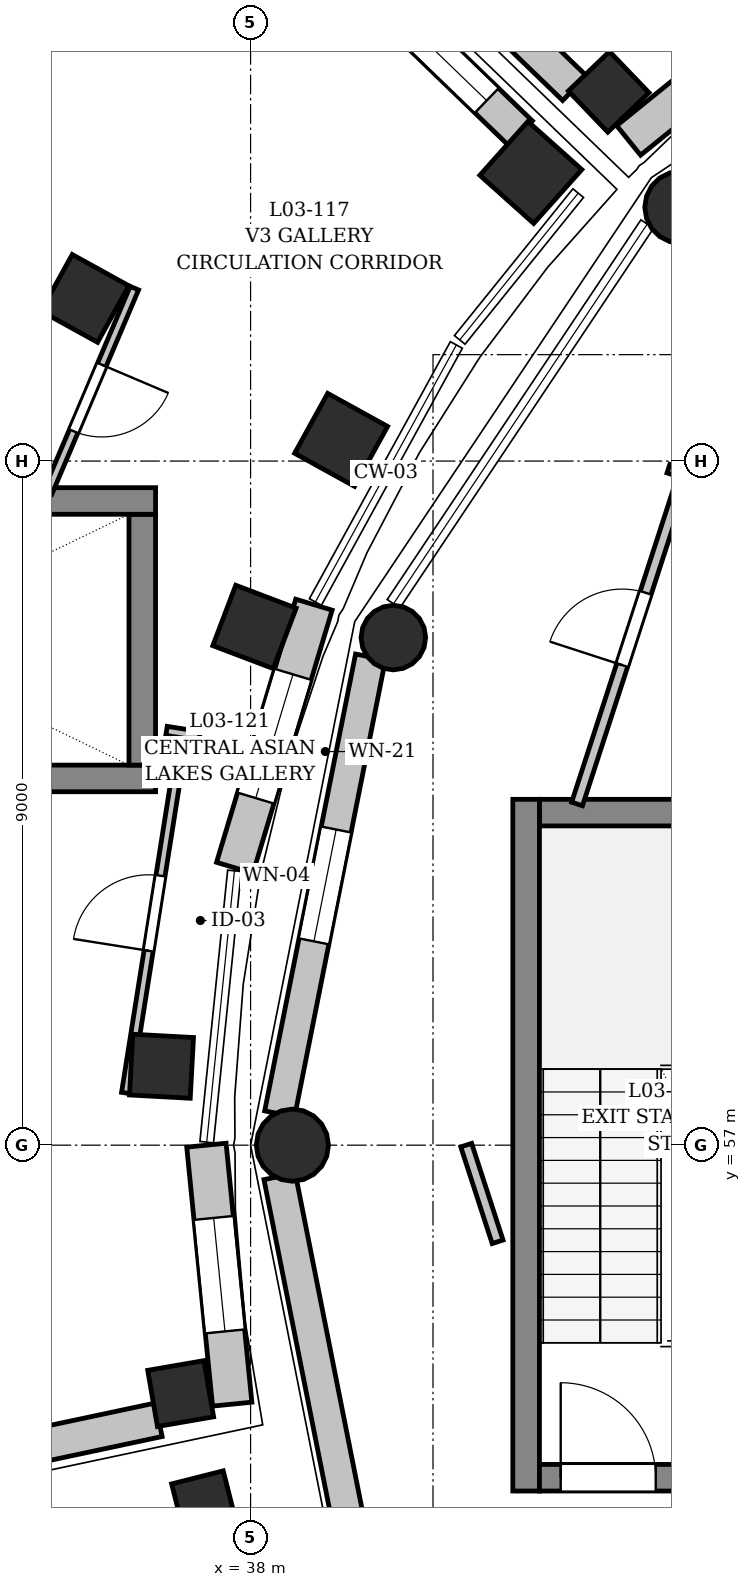
"""IFC4 building model, lengths in metres.
Left out: names, types, materials, properties, quantities, classifications, styles, units other than length and angle.
Written with IfcOpenShell. Run it as: python <this file> out.ifc"""

import sys

from ifc_helpers import new_model, si_unit, direction, frame, frame_2d, origin, origin_2d, place, context, subcontext, project, spatial, rectangle, circle, extrude, element, fill, save


model = new_model("IFC4")
c1 = context("Model", 3, precision=1e-05, world=origin(), true_north=direction((0.0, 1.0)))
c2 = subcontext(c1, "Body", "Model", "MODEL_VIEW")
j1 = project(units=[si_unit("LENGTHUNIT", "METRE"), si_unit("PLANEANGLEUNIT", "RADIAN")], contexts=[c1])
p1 = place(None, origin())
s1 = spatial("IfcSite", under=j1, at=p1, CompositionType="ELEMENT")
p2 = place(p1, origin())
s2 = spatial("IfcBuilding", under=s1, at=p2, CompositionType="ELEMENT")
p3 = place(p2, frame((0.0, 0.0, 10.2)))
s3 = spatial("IfcBuildingStorey", under=s2, at=p3, CompositionType="ELEMENT", Elevation=10.2)
p4 = place(p3, frame((43.661, 69.339, 0.0), z_axis=(0.0, 0.0, 1.0), x_axis=(-0.707106781187, 0.707106781187, 0.0)))
e1 = element("IfcColumn", 1, at=p4, inside=s3, PredefinedType="COLUMN", context=c2, shape_type="SweptSolid", body=[
    extrude(circle(Radius=0.475, at=origin_2d()), origin(), (0.0, 0.0, 1.0), 4.45),
])
p5 = place(p3, frame((39.878, 63.678, 0.0), z_axis=(0.0, 0.0, 1.0), x_axis=(-0.923879532511, 0.382683432365, 0.0)))
e2 = element("IfcColumn", 2, at=p5, inside=s3, PredefinedType="COLUMN", context=c2, shape_type="SweptSolid", body=[
    extrude(circle(Radius=0.425, at=origin_2d()), origin(), (0.0, 0.0, 1.0), 4.45),
])
p6 = place(p3, frame((38.55, 57.0, 0.0), z_axis=(0.0, 0.0, 1.0), x_axis=(-1.0, 0.0, 0.0)))
e3 = element("IfcColumn", 3, at=p6, inside=s3, PredefinedType="COLUMN", context=c2, shape_type="SweptSolid", body=[
    extrude(circle(Radius=0.475, at=origin_2d()), origin(), (0.0, 0.0, 1.0), 4.45),
])
p7 = place(p3, frame((41.687, 69.797, 0.0), z_axis=(0.0, 0.0, 1.0), x_axis=(-0.745475999683, 0.666532470249, 0.0)))
e4 = element("IfcColumn", 4, at=p7, inside=s3, PredefinedType="COLUMN", context=c2, shape_type="SweptSolid", body=[
    extrude(rectangle(XDim=0.95, YDim=0.95, at=origin_2d()), origin(), (0.0, 0.0, 1.0), 4.58),
])
p8 = place(p3, frame((39.191, 66.279, 0.0), z_axis=(0.0, 0.0, 1.0), x_axis=(-0.875464527, 0.483282383255, 0.0)))
e5 = element("IfcColumn", 5, at=p8, inside=s3, PredefinedType="COLUMN", context=c2, shape_type="SweptSolid", body=[
    extrude(rectangle(XDim=0.9, YDim=0.9, at=origin_2d()), origin(), (0.0, 0.0, 1.0), 4.58),
])
for number, where, z_axis, x_axis in (
    (6, (35.821, 68.14, 0.0), (0.0, 0.0, 1.0), (-0.875, 0.483, 0.0)),
    (7, (38.051, 63.818, 0.0), (0.0, 0.0, 1.0), (-0.935, 0.355, 0.0)),
):
    element("IfcColumn", number, at=place(p3, frame(where, z_axis=z_axis, x_axis=x_axis)), inside=s3, PredefinedType="COLUMN", context=c2, shape_type="SweptSolid", body=[
        extrude(rectangle(XDim=0.85, YDim=0.85, at=origin_2d()), origin(), (0.0, 0.0, 1.0), 4.58),
    ])
p9 = place(p3, frame((36.828, 58.038, 0.0), z_axis=(0.0, 0.0, 1.0), x_axis=(-0.998536670326, 0.054078812985, 0.0)))
e8 = element("IfcColumn", 8, at=p9, inside=s3, PredefinedType="COLUMN", context=c2, shape_type="SweptSolid", body=[
    extrude(rectangle(XDim=0.8, YDim=0.8, at=origin_2d()), origin(), (0.0, 0.0, 1.0), 4.58),
])
p10 = place(p3, frame((37.08, 53.732, 0.0), z_axis=(0.0, 0.0, 1.0), x_axis=(-0.985407898483, -0.170209499166, 0.0)))
e9 = element("IfcColumn", 9, at=p10, inside=s3, PredefinedType="COLUMN", context=c2, shape_type="SweptSolid", body=[
    extrude(rectangle(XDim=0.75, YDim=0.75, at=origin_2d()), origin(), (0.0, 0.0, 1.0), 4.58),
])
p11 = place(p3, frame((42.711, 70.858, 0.0), z_axis=(0.0, 0.0, 1.0), x_axis=(-0.69214317387, 0.721760228098, 0.0)))
e10 = element("IfcColumn", 10, at=p11, inside=s3, PredefinedType="COLUMN", context=c2, shape_type="SweptSolid", body=[
    extrude(rectangle(XDim=0.75, YDim=0.75, at=origin_2d()), origin(), (0.0, 0.0, 1.0), 4.52),
])
p12 = place(p3, frame((37.387, 52.29, -0.22), z_axis=(0.0, 0.0, 1.0), x_axis=(-0.969445349895, -0.245307385879, 0.0)))
e11 = element("IfcColumn", 11, at=p12, inside=s3, PredefinedType="COLUMN", context=c2, shape_type="SweptSolid", body=[
    extrude(rectangle(XDim=0.7, YDim=0.7, at=origin_2d()), origin(), (0.0, 0.0, 1.0), 0.423),
])
p13 = place(p3, frame((38.382, 57.412, 0.0), z_axis=(0.0, 0.0, 1.0), x_axis=(0.195089418663, 0.980785460091, 0.0)))
e12 = element("IfcWall", 12, at=p13, inside=s3, PredefinedType="SOLIDWALL", context=c2, shape_type="SweptSolid", body=[
    extrude(rectangle(XDim=6.128, YDim=0.4, at=frame_2d((3.064, 0.0))), origin(), (0.0, 0.0, 1.0), 3.94),
])
p14 = place(p13, frame((2.314, 0.0, 0.9)))
e13 = element("IfcOpeningElement", 13, at=p14, cuts=e12, PredefinedType="OPENING", context=c2, shape_type="SweptSolid", body=[
    extrude(rectangle(XDim=1.5, YDim=2.1, at=frame_2d((0.75, 1.05))), frame((0.0, 0.21, 0.0), z_axis=(0.0, -1.0, 0.0), x_axis=(1.0, 0.0, 0.0)), (0.0, 0.0, 1.0), 0.42),
])
p15 = place(p3, frame((39.577, 50.578, 0.0), z_axis=(0.0, 0.0, 1.0), x_axis=(-0.195089418663, 0.980785460091, 0.0)))
e14 = element("IfcWall", 14, at=p15, inside=s3, PredefinedType="SOLIDWALL", context=c2, shape_type="SweptSolid", body=[
    extrude(rectangle(XDim=6.128, YDim=0.42, at=frame_2d((3.064, 0.0))), origin(), (0.0, 0.0, 1.0), 3.52),
])
p16 = place(p3, frame((38.833, 64.111, 0.0), z_axis=(0.0, 0.0, 1.0), x_axis=(-0.288190467342, -0.957573106626, 0.0)))
e15 = element("IfcWall", 15, at=p16, inside=s3, PredefinedType="SOLIDWALL", context=c2, shape_type="SweptSolid", body=[
    extrude(rectangle(XDim=3.615, YDim=0.5, at=frame_2d((1.807, 0.0))), origin(), (0.0, 0.0, 1.0), 5.16),
])
p17 = place(p16, frame((0.958, 0.0, 0.9)))
e16 = element("IfcOpeningElement", 16, at=p17, cuts=e15, PredefinedType="OPENING", context=c2, shape_type="SweptSolid", body=[
    extrude(rectangle(XDim=1.7, YDim=1.55, at=frame_2d((0.85, 0.775))), frame((0.0, 0.26, 0.0), z_axis=(0.0, -1.0, 0.0), x_axis=(1.0, 0.0, 0.0)), (0.0, 0.0, 1.0), 0.52),
])
p18 = place(p3, frame((37.419, 57.0, 0.0), z_axis=(0.0, 0.0, 1.0), x_axis=(0.09912244439, -0.995075243898, 0.0)))
e17 = element("IfcWall", 17, at=p18, inside=s3, PredefinedType="SOLIDWALL", context=c2, shape_type="SweptSolid", body=[
    extrude(rectangle(XDim=3.424, YDim=0.52, at=frame_2d((1.712, 0.0))), origin(), (0.0, 0.0, 1.0), 5.16),
])
p19 = place(p18, frame((0.962, 0.0, 0.9)))
e18 = element("IfcOpeningElement", 18, at=p19, cuts=e17, PredefinedType="OPENING", context=c2, shape_type="SweptSolid", body=[
    extrude(rectangle(XDim=1.5, YDim=2.1, at=frame_2d((0.75, 1.05))), frame((0.0, 0.27, 0.0), z_axis=(0.0, -1.0, 0.0), x_axis=(1.0, 0.0, 0.0)), (0.0, 0.0, 1.0), 0.54),
])
p20 = place(p3, frame((36.79, 53.387, 0.0), z_axis=(0.0, 0.0, 1.0), x_axis=(-0.978151790835, -0.207891976965, 0.0)))
e19 = element("IfcWall", 19, at=p20, inside=s3, PredefinedType="SOLIDWALL", context=c2, shape_type="SweptSolid", body=[
    extrude(rectangle(XDim=6.153, YDim=0.45, at=frame_2d((3.076, 0.0))), origin(), (0.0, 0.0, 1.0), 4.723),
])
p21 = place(p3, frame((39.403, 72.389, 0.0), z_axis=(0.0, 0.0, 1.0), x_axis=(0.719339497973, -0.694658683568, 0.0)))
e20 = element("IfcWall", 20, at=p21, inside=s3, PredefinedType="SOLIDWALL", context=c2, shape_type="SweptSolid", body=[
    extrude(rectangle(XDim=2.987, YDim=0.45, at=frame_2d((1.494, 0.0))), origin(), (0.0, 0.0, 1.0), 4.723),
])
p22 = place(p21, frame((0.619, 0.0, 0.9)))
e21 = element("IfcOpeningElement", 21, at=p22, cuts=e20, PredefinedType="OPENING", context=c2, shape_type="SweptSolid", body=[
    extrude(rectangle(XDim=1.75, YDim=1.85, at=frame_2d((0.875, 0.925))), frame((0.0, 0.235, 0.0), z_axis=(0.0, -1.0, 0.0), x_axis=(1.0, 0.0, 0.0)), (0.0, 0.0, 1.0), 0.47),
])
p23 = place(p3, frame((42.262, 70.906, 0.0), z_axis=(0.0, 0.0, 1.0), x_axis=(-0.719350100281, 0.694647704398, 0.0)))
e22 = element("IfcWall", 22, at=p23, inside=s3, PredefinedType="SOLIDWALL", context=c2, shape_type="SweptSolid", body=[
    extrude(rectangle(XDim=11.959, YDim=0.45, at=frame_2d((5.979, 0.0))), origin(), (0.0, 0.0, 1.0), 3.66),
])
p24 = place(p23, frame((3.984, 0.0, 0.9)))
e23 = element("IfcOpeningElement", 23, at=p24, cuts=e22, PredefinedType="OPENING", context=c2, shape_type="SweptSolid", body=[
    extrude(rectangle(XDim=1.95, YDim=2.0, at=frame_2d((0.975, 1.0))), frame((0.0, 0.235, 0.0), z_axis=(0.0, -1.0, 0.0), x_axis=(1.0, 0.0, 0.0)), (0.0, 0.0, 1.0), 0.47),
])
p25 = place(p23, frame((6.804, 0.0, 0.9)))
e24 = element("IfcOpeningElement", 24, at=p25, cuts=e22, PredefinedType="OPENING", context=c2, shape_type="SweptSolid", body=[
    extrude(rectangle(XDim=1.95, YDim=2.0, at=frame_2d((0.975, 1.0))), frame((0.0, 0.235, 0.0), z_axis=(0.0, -1.0, 0.0), x_axis=(1.0, 0.0, 0.0)), (0.0, 0.0, 1.0), 0.47),
])
p26 = place(p3, frame((45.886, 72.574, 0.0), z_axis=(0.0, 0.0, 1.0), x_axis=(-0.777525600638, -0.628851286357, 0.0)))
e25 = element("IfcWall", 25, at=p26, inside=s3, PredefinedType="SOLIDWALL", context=c2, shape_type="SweptSolid", body=[
    extrude(rectangle(XDim=3.746, YDim=0.5, at=frame_2d((1.873, 0.0))), origin(), (0.0, 0.0, 1.0), 4.52),
])
p27 = place(p26, frame((0.973, 0.0, 0.9)))
e26 = element("IfcOpeningElement", 26, at=p27, cuts=e25, PredefinedType="OPENING", context=c2, shape_type="SweptSolid", body=[
    extrude(rectangle(XDim=1.8, YDim=2.1, at=frame_2d((0.9, 1.05))), frame((0.0, 0.26, 0.0), z_axis=(0.0, -1.0, 0.0), x_axis=(1.0, 0.0, 0.0)), (0.0, 0.0, 1.0), 0.52),
])
p28 = place(p3, frame((45.2, 61.375, 0.0), z_axis=(0.0, 0.0, 1.0), x_axis=(-1.0, 0.0, 0.0)))
e27 = element("IfcWall", 27, at=p28, inside=s3, PredefinedType="SHEAR", context=c2, shape_type="SweptSolid", body=[
    extrude(rectangle(XDim=3.4, YDim=0.35, at=frame_2d((1.7, 0.0))), origin(), (0.0, 0.0, 1.0), 4.45),
])
p29 = place(p3, frame((41.625, 61.55, 0.0), z_axis=(0.0, 0.0, 1.0), x_axis=(0.0, -1.0, 0.0)))
e28 = element("IfcWall", 28, at=p29, inside=s3, PredefinedType="SHEAR", context=c2, shape_type="SweptSolid", body=[
    extrude(rectangle(XDim=9.1, YDim=0.35, at=frame_2d((4.55, 0.0))), origin(), (0.0, 0.0, 1.0), 4.45),
])
p30 = place(p3, frame((41.8, 52.625, 0.0), z_axis=(0.0, 0.0, 1.0), x_axis=(1.0, 0.0, 0.0)))
e29 = element("IfcWall", 29, at=p30, inside=s3, PredefinedType="SHEAR", context=c2, shape_type="SweptSolid", body=[
    extrude(rectangle(XDim=3.4, YDim=0.35, at=frame_2d((1.7, 0.0))), origin(), (0.0, 0.0, 1.0), 4.45),
])
p31 = place(p30, frame((0.28, 0.0, 0.0)))
e30 = element("IfcOpeningElement", 30, at=p31, cuts=e29, PredefinedType="OPENING", context=c2, shape_type="SweptSolid", body=[
    extrude(rectangle(XDim=1.25, YDim=2.2, at=frame_2d((0.625, 1.1))), frame((0.0, 0.185, 0.0), z_axis=(0.0, -1.0, 0.0), x_axis=(1.0, 0.0, 0.0)), (0.0, 0.0, 1.0), 0.37),
])
p32 = place(p3, frame((27.65, 61.825, 0.0), z_axis=(0.0, 0.0, 1.0), x_axis=(1.0, 0.0, 0.0)))
e31 = element("IfcWall", 31, at=p32, inside=s3, PredefinedType="SHEAR", context=c2, shape_type="SweptSolid", body=[
    extrude(rectangle(XDim=9.1, YDim=0.35, at=frame_2d((4.55, 0.0))), origin(), (0.0, 0.0, 1.0), 3.6),
])
p33 = place(p3, frame((36.575, 62.0, 0.0), z_axis=(0.0, 0.0, 1.0), x_axis=(0.0, 1.0, 0.0)))
e32 = element("IfcWall", 32, at=p33, inside=s3, PredefinedType="SHEAR", context=c2, shape_type="SweptSolid", body=[
    extrude(rectangle(XDim=3.3, YDim=0.35, at=frame_2d((1.65, 0.0))), origin(), (0.0, 0.0, 1.0), 3.6),
])
p34 = place(p3, frame((36.75, 65.475, 0.0), z_axis=(0.0, 0.0, 1.0), x_axis=(-1.0, 0.0, 0.0)))
e33 = element("IfcWall", 33, at=p34, inside=s3, PredefinedType="SHEAR", context=c2, shape_type="SweptSolid", body=[
    extrude(rectangle(XDim=9.1, YDim=0.35, at=frame_2d((4.55, 0.0))), origin(), (0.0, 0.0, 1.0), 3.6),
])
p35 = place(p3, frame((42.295, 61.489, 0.0), z_axis=(0.0, 0.0, 1.0), x_axis=(0.309018385136, 0.951056064408, 0.0)))
e34 = element("IfcWall", 34, at=p35, inside=s3, PredefinedType="PARTITIONING", context=c2, shape_type="SweptSolid", body=[
    extrude(rectangle(XDim=4.567, YDim=0.15, at=frame_2d((2.284, 0.0))), origin(), (0.0, 0.0, 1.0), 4.45),
])
p36 = place(p35, frame((1.921, 0.0, 0.0)))
e35 = element("IfcOpeningElement", 35, at=p36, cuts=e34, PredefinedType="OPENING", context=c2, shape_type="SweptSolid", body=[
    extrude(rectangle(XDim=1.0, YDim=2.2, at=frame_2d((0.5, 1.1))), frame((0.0, 0.085, 0.0), z_axis=(0.0, -1.0, 0.0), x_axis=(1.0, 0.0, 0.0)), (0.0, 0.0, 1.0), 0.17),
])
p37 = place(p3, frame((41.25, 55.729, 0.0), z_axis=(0.0, 0.0, 1.0), x_axis=(-0.30898696848, 0.951066271776, 0.0)))
e36 = element("IfcWall", 36, at=p37, inside=s3, PredefinedType="PARTITIONING", context=c2, shape_type="SweptSolid", body=[
    extrude(rectangle(XDim=1.337, YDim=0.15, at=frame_2d((0.668, 0.0))), origin(), (0.0, 0.0, 1.0), 4.45),
])
p38 = place(p3, frame((43.916, 65.765, 0.0), z_axis=(0.0, 0.0, 1.0), x_axis=(-0.951042223598, 0.309060979314, 0.0)))
e37 = element("IfcWall", 37, at=p38, inside=s3, PredefinedType="PARTITIONING", context=c2, shape_type="SweptSolid", body=[
    extrude(rectangle(XDim=0.44, YDim=0.12, at=frame_2d((0.22, 0.0))), origin(), (0.0, 0.0, 1.0), 4.45),
])
p39 = place(p3, frame((36.362, 57.686, 0.0), z_axis=(0.0, 0.0, 1.0), x_axis=(0.156391852422, 0.987695088829, 0.0)))
e38 = element("IfcWall", 38, at=p39, inside=s3, PredefinedType="PARTITIONING", context=c2, shape_type="SweptSolid", body=[
    extrude(rectangle(XDim=4.789, YDim=0.12, at=frame_2d((2.395, 0.0))), origin(), (0.0, 0.0, 1.0), 3.55),
])
p40 = place(p39, frame((1.895, 0.0, 0.0)))
e39 = element("IfcOpeningElement", 39, at=p40, cuts=e38, PredefinedType="OPENING", context=c2, shape_type="SweptSolid", body=[
    extrude(rectangle(XDim=1.0, YDim=2.2, at=frame_2d((0.5, 1.1))), frame((0.0, 0.07, 0.0), z_axis=(0.0, -1.0, 0.0), x_axis=(1.0, 0.0, 0.0)), (0.0, 0.0, 1.0), 0.14),
])
p41 = place(p3, frame((36.471, 68.275, 0.0), z_axis=(0.0, 0.0, 1.0), x_axis=(-0.39080089657, -0.920475235539, 0.0)))
e40 = element("IfcWall", 40, at=p41, inside=s3, PredefinedType="PARTITIONING", context=c2, shape_type="SweptSolid", body=[
    extrude(rectangle(XDim=2.922, YDim=0.12, at=frame_2d((1.461, 0.0))), origin(), (0.0, 0.0, 1.0), 3.55),
])
p42 = place(p41, frame((1.095, 0.0, 0.0)))
e41 = element("IfcOpeningElement", 41, at=p42, cuts=e40, PredefinedType="OPENING", context=c2, shape_type="SweptSolid", body=[
    extrude(rectangle(XDim=0.95, YDim=2.2, at=frame_2d((0.475, 1.1))), frame((0.0, 0.07, 0.0), z_axis=(0.0, -1.0, 0.0), x_axis=(1.0, 0.0, 0.0)), (0.0, 0.0, 1.0), 0.14),
])
p43 = place(p3, frame((37.329, 62.382, 0.0), z_axis=(0.0, 0.0, 1.0), x_axis=(-0.987695424831, 0.156389730378, 0.0)))
e42 = element("IfcWall", 42, at=p43, inside=s3, PredefinedType="PARTITIONING", context=c2, shape_type="SweptSolid", body=[
    extrude(rectangle(XDim=0.44, YDim=0.12, at=frame_2d((0.22, 0.0))), origin(), (0.0, 0.0, 1.0), 3.55),
])
p44 = place(p14, origin())
e43 = element("IfcWindow", 43, at=p44, inside=s3, PartitioningType="DOUBLE_PANEL_VERTICAL", PredefinedType="WINDOW", context=c2, shape_type="SweptSolid", body=[
    extrude(rectangle(XDim=1.5, YDim=2.1, at=frame_2d((0.75, 1.05))), frame((0.0, 0.03, 0.0), z_axis=(0.0, -1.0, 0.0), x_axis=(1.0, 0.0, 0.0)), (0.0, 0.0, 1.0), 0.06),
])
fill(e13, e43)
p45 = place(p17, origin())
e44 = element("IfcWindow", 44, at=p45, inside=s3, PartitioningType="DOUBLE_PANEL_VERTICAL", PredefinedType="WINDOW", context=c2, shape_type="SweptSolid", body=[
    extrude(rectangle(XDim=1.7, YDim=1.55, at=frame_2d((0.85, 0.775))), frame((0.0, 0.03, 0.0), z_axis=(0.0, -1.0, 0.0), x_axis=(1.0, 0.0, 0.0)), (0.0, 0.0, 1.0), 0.06),
])
fill(e16, e44)
p46 = place(p19, origin())
e45 = element("IfcWindow", 45, at=p46, inside=s3, PartitioningType="DOUBLE_PANEL_VERTICAL", PredefinedType="WINDOW", context=c2, shape_type="SweptSolid", body=[
    extrude(rectangle(XDim=1.5, YDim=2.1, at=frame_2d((0.75, 1.05))), frame((0.0, 0.03, 0.0), z_axis=(0.0, -1.0, 0.0), x_axis=(1.0, 0.0, 0.0)), (0.0, 0.0, 1.0), 0.06),
])
fill(e18, e45)
p47 = place(p22, origin())
e46 = element("IfcWindow", 46, at=p47, inside=s3, PartitioningType="DOUBLE_PANEL_VERTICAL", PredefinedType="WINDOW", context=c2, shape_type="SweptSolid", body=[
    extrude(rectangle(XDim=1.75, YDim=1.85, at=frame_2d((0.875, 0.925))), frame((0.0, 0.03, 0.0), z_axis=(0.0, -1.0, 0.0), x_axis=(1.0, 0.0, 0.0)), (0.0, 0.0, 1.0), 0.06),
])
fill(e21, e46)
p48 = place(p31, origin())
e47 = element("IfcDoor", 47, at=p48, inside=s3, OperationType="SINGLE_SWING_RIGHT", PredefinedType="DOOR", context=c2, shape_type="SweptSolid", body=[
    extrude(rectangle(XDim=1.25, YDim=2.2, at=frame_2d((0.625, 1.1))), frame((0.0, 0.025, 0.0), z_axis=(0.0, -1.0, 0.0), x_axis=(1.0, 0.0, 0.0)), (0.0, 0.0, 1.0), 0.05),
])
fill(e30, e47)
p49 = place(p36, origin())
e48 = element("IfcDoor", 48, at=p49, inside=s3, OperationType="SINGLE_SWING_LEFT", PredefinedType="DOOR", context=c2, shape_type="SweptSolid", body=[
    extrude(rectangle(XDim=1.0, YDim=2.2, at=frame_2d((0.5, 1.1))), frame((0.0, 0.025, 0.0), z_axis=(0.0, -1.0, 0.0), x_axis=(1.0, 0.0, 0.0)), (0.0, 0.0, 1.0), 0.05),
])
fill(e35, e48)
p50 = place(p40, origin())
e49 = element("IfcDoor", 49, at=p50, inside=s3, OperationType="SINGLE_SWING_RIGHT", PredefinedType="DOOR", context=c2, shape_type="SweptSolid", body=[
    extrude(rectangle(XDim=1.0, YDim=2.2, at=frame_2d((0.5, 1.1))), frame((0.0, 0.025, 0.0), z_axis=(0.0, -1.0, 0.0), x_axis=(1.0, 0.0, 0.0)), (0.0, 0.0, 1.0), 0.05),
])
fill(e39, e49)
p51 = place(p42, origin())
e50 = element("IfcDoor", 50, at=p51, inside=s3, OperationType="SINGLE_SWING_RIGHT", PredefinedType="DOOR", context=c2, shape_type="SweptSolid", body=[
    extrude(rectangle(XDim=0.95, YDim=2.2, at=frame_2d((0.475, 1.1))), frame((0.0, 0.025, 0.0), z_axis=(0.0, -1.0, 0.0), x_axis=(1.0, 0.0, 0.0)), (0.0, 0.0, 1.0), 0.05),
])
fill(e41, e50)
save(model, sys.argv[1])
